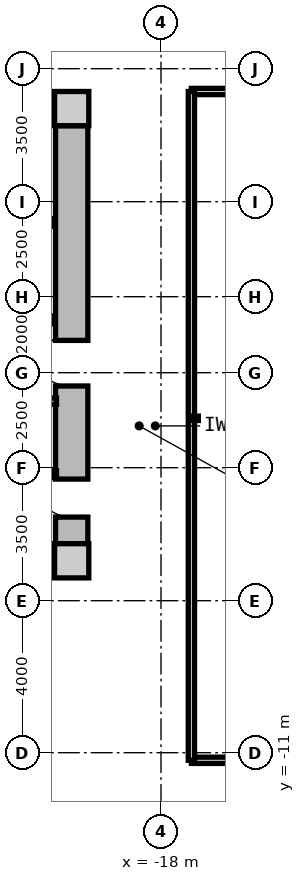
"""IFC4 building model, lengths in metres.
Left out: names, types, materials, properties, quantities, classifications, styles, units other than length and angle.
Written with IfcOpenShell. Run it as: python <this file> out.ifc"""

import sys

from ifc_helpers import new_model, si_unit, direction, frame, frame_2d, origin, origin_2d, place, context, subcontext, project, spatial, rectangle, extrude, source, transform, mapped, element, fill, save


model = new_model("IFC4")
c1 = context("Model", 3, precision=1e-05, world=origin(), true_north=direction((0.0, 1.0)))
c2 = subcontext(c1, "Body", "Model", "MODEL_VIEW")
j1 = project(units=[si_unit("LENGTHUNIT", "METRE"), si_unit("PLANEANGLEUNIT", "RADIAN")], contexts=[c1])
p1 = place(None, origin())
s1 = spatial("IfcSite", under=j1, at=p1, CompositionType="ELEMENT")
p2 = place(p1, origin())
s2 = spatial("IfcBuilding", under=s1, at=p2, CompositionType="ELEMENT")
p3 = place(p2, frame((0.0, 0.0, 16.8)))
s3 = spatial("IfcBuildingStorey", under=s2, at=p3, CompositionType="ELEMENT", Elevation=16.8)
m1 = source(origin(), c2, "Body", "SweptSolid", [
    extrude(rectangle(XDim=0.9, YDim=0.9, at=origin_2d()), origin(), (0.0, 0.0, 1.0), 4.8),
])
for number, where, z_axis, x_axis in (
    (1, (-20.35, -5.95, 0.0), (0.0, 0.0, 1.0), (1.0, 0.0, 0.0)),
    (2, (-20.35, 5.95, 0.0), (0.0, 0.0, 1.0), (1.0, 0.0, 0.0)),
):
    element("IfcColumn", number, at=place(p3, frame(where, z_axis=z_axis, x_axis=x_axis)), inside=s3, PredefinedType="COLUMN", context=c2, shape_type="MappedRepresentation", body=[
        mapped(m1, transform((0.0, 0.0, 0.0), x_axis=(1.0, 0.0, 0.0), y_axis=(0.0, 1.0, 0.0), z_axis=(0.0, 0.0, 1.0), scale=1.0)),
    ])
m2 = source(origin(), c2, "Body", "SweptSolid", [
    extrude(rectangle(XDim=14.4, YDim=0.85, at=frame_2d((7.2, 0.0))), origin(), (0.0, 0.0, 1.0), 4.38),
])
for number, where, z_axis, x_axis in (
    (3, (-35.2, 5.95, 0.0), (0.0, 0.0, 1.0), (1.0, 0.0, 0.0)),
    (4, (-20.8, -5.95, 0.0), (0.0, 0.0, 1.0), (-1.0, 0.0, 0.0)),
):
    element("IfcWall", number, at=place(p3, frame(where, z_axis=z_axis, x_axis=x_axis)), inside=s3, PredefinedType="SHEAR", context=c2, shape_type="MappedRepresentation", body=[
        mapped(m2, transform((0.0, 0.0, 0.0), x_axis=(1.0, 0.0, 0.0), y_axis=(0.0, 1.0, 0.0), z_axis=(0.0, 0.0, 1.0), scale=1.0)),
    ])
m3 = source(origin(), c2, "Body", "SweptSolid", [
    extrude(rectangle(XDim=11.0, YDim=0.85, at=frame_2d((5.5, 0.0))), origin(), (0.0, 0.0, 1.0), 4.38),
])
p4 = place(p3, frame((-20.35, 5.5, 0.0), z_axis=(0.0, 0.0, 1.0), x_axis=(0.0, -1.0, 0.0)))
e5 = element("IfcWall", 5, at=p4, inside=s3, PredefinedType="SHEAR", context=c2, shape_type="MappedRepresentation", body=[
    mapped(m3, transform((0.0, 0.0, 0.0), x_axis=(1.0, 0.0, 0.0), y_axis=(0.0, 1.0, 0.0), z_axis=(0.0, 0.0, 1.0), scale=1.0)),
])
p5 = place(p4, frame((5.65, 0.0, 0.0)))
e6 = element("IfcOpeningElement", 6, at=p5, cuts=e5, PredefinedType="OPENING", context=c2, shape_type="SweptSolid", body=[
    extrude(rectangle(XDim=1.2, YDim=2.15, at=frame_2d((0.6, 1.075))), frame((0.0, 0.435, 0.0), z_axis=(0.0, -1.0, 0.0), x_axis=(1.0, 0.0, 0.0)), (0.0, 0.0, 1.0), 0.87),
])
p6 = place(p4, frame((9.3, 0.0, 0.0)))
e7 = element("IfcOpeningElement", 7, at=p6, cuts=e5, PredefinedType="OPENING", context=c2, shape_type="SweptSolid", body=[
    extrude(rectangle(XDim=1.0, YDim=2.1, at=frame_2d((0.5, 1.05))), frame((0.0, 0.435, 0.0), z_axis=(0.0, -1.0, 0.0), x_axis=(1.0, 0.0, 0.0)), (0.0, 0.0, 1.0), 0.87),
])
m4 = source(origin(), c2, "Body", "SweptSolid", [
    extrude(rectangle(XDim=3.2, YDim=0.2, at=frame_2d((1.6, 0.0))), origin(), (0.0, 0.0, 1.0), 4.365),
])
p7 = place(p3, frame((-24.0, 2.95, 0.0), z_axis=(0.0, 0.0, 1.0), x_axis=(1.0, 0.0, 0.0)))
e8 = element("IfcWall", 8, at=p7, inside=s3, PredefinedType="PARTITIONING", context=c2, shape_type="MappedRepresentation", body=[
    mapped(m4, transform((0.0, 0.0, 0.0), x_axis=(1.0, 0.0, 0.0), y_axis=(0.0, 1.0, 0.0), z_axis=(0.0, 0.0, 1.0), scale=1.0)),
])
m5 = source(origin(), c2, "Body", "SweptSolid", [
    extrude(rectangle(XDim=6.66, YDim=0.21, at=frame_2d((3.33, 0.0))), origin(), (0.0, 0.0, 1.0), 4.365),
])
p8 = place(p3, frame((-27.46, 0.39, 0.0), z_axis=(0.0, 0.0, 1.0), x_axis=(1.0, 0.0, 0.0)))
e9 = element("IfcWall", 9, at=p8, inside=s3, PredefinedType="PARTITIONING", context=c2, shape_type="MappedRepresentation", body=[
    mapped(m5, transform((0.0, 0.0, 0.0), x_axis=(1.0, 0.0, 0.0), y_axis=(0.0, 1.0, 0.0), z_axis=(0.0, 0.0, 1.0), scale=1.0)),
])
p9 = place(p8, frame((1.0, 0.0, 0.0)))
e10 = element("IfcOpeningElement", 10, at=p9, cuts=e9, PredefinedType="OPENING", context=c2, shape_type="SweptSolid", body=[
    extrude(rectangle(XDim=1.2, YDim=2.15, at=frame_2d((0.6, 1.075))), frame((0.0, 0.115, 0.0), z_axis=(0.0, -1.0, 0.0), x_axis=(1.0, 0.0, 0.0)), (0.0, 0.0, 1.0), 0.23),
])
m6 = source(origin(), c2, "Body", "SweptSolid", [
    extrude(rectangle(XDim=2.7, YDim=0.165, at=frame_2d((1.35, 0.0))), origin(), (0.0, 0.0, 1.0), 4.365),
])
p10 = place(p3, frame((-23.45, -1.75, 0.0), z_axis=(0.0, 0.0, 1.0), x_axis=(1.0, 0.0, 0.0)))
e11 = element("IfcWall", 11, at=p10, inside=s3, PredefinedType="PARTITIONING", context=c2, shape_type="MappedRepresentation", body=[
    mapped(m6, transform((0.0, 0.0, 0.0), x_axis=(1.0, 0.0, 0.0), y_axis=(0.0, 1.0, 0.0), z_axis=(0.0, 0.0, 1.0), scale=1.0)),
])
p11 = place(p10, frame((0.85, 0.0, 0.0)))
e12 = element("IfcOpeningElement", 12, at=p11, cuts=e11, PredefinedType="OPENING", context=c2, shape_type="SweptSolid", body=[
    extrude(rectangle(XDim=0.925, YDim=2.1, at=frame_2d((0.462, 1.05))), frame((0.0, 0.093, 0.0), z_axis=(0.0, -1.0, 0.0), x_axis=(1.0, 0.0, 0.0)), (0.0, 0.0, 1.0), 0.185),
])
m7 = source(origin(), c2, "Body", "SweptSolid", [
    extrude(rectangle(XDim=2.7, YDim=0.14, at=frame_2d((1.35, 0.0))), origin(), (0.0, 0.0, 1.0), 4.365),
])
p12 = place(p3, frame((-23.45, -3.65, 0.0), z_axis=(0.0, 0.0, 1.0), x_axis=(1.0, 0.0, 0.0)))
e13 = element("IfcWall", 13, at=p12, inside=s3, PredefinedType="PARTITIONING", context=c2, shape_type="MappedRepresentation", body=[
    mapped(m7, transform((0.0, 0.0, 0.0), x_axis=(1.0, 0.0, 0.0), y_axis=(0.0, 1.0, 0.0), z_axis=(0.0, 0.0, 1.0), scale=1.0)),
])
m8 = source(origin(), c2, "Body", "SweptSolid", [
    extrude(rectangle(XDim=34.4, YDim=0.165, at=frame_2d((17.2, 0.0))), origin(), (0.0, 0.0, 1.0), 4.365),
])
p13 = place(p3, frame((-17.2, -11.2, 0.0), z_axis=(0.0, 0.0, 1.0), x_axis=(1.0, 0.0, 0.0)))
e14 = element("IfcWall", 14, at=p13, inside=s3, PredefinedType="PARTITIONING", context=c2, shape_type="MappedRepresentation", body=[
    mapped(m8, transform((0.0, 0.0, 0.0), x_axis=(1.0, 0.0, 0.0), y_axis=(0.0, 1.0, 0.0), z_axis=(0.0, 0.0, 1.0), scale=1.0)),
])
p14 = place(p13, frame((2.2, 0.0, 0.0)))
e15 = element("IfcOpeningElement", 15, at=p14, cuts=e14, PredefinedType="OPENING", context=c2, shape_type="SweptSolid", body=[
    extrude(rectangle(XDim=1.05, YDim=2.15, at=frame_2d((0.525, 1.075))), frame((0.0, 0.093, 0.0), z_axis=(0.0, -1.0, 0.0), x_axis=(1.0, 0.0, 0.0)), (0.0, 0.0, 1.0), 0.185),
])
p15 = place(p13, frame((7.55, 0.0, 0.0)))
e16 = element("IfcOpeningElement", 16, at=p15, cuts=e14, PredefinedType="OPENING", context=c2, shape_type="SweptSolid", body=[
    extrude(rectangle(XDim=1.05, YDim=2.15, at=frame_2d((0.525, 1.075))), frame((0.0, 0.093, 0.0), z_axis=(0.0, -1.0, 0.0), x_axis=(1.0, 0.0, 0.0)), (0.0, 0.0, 1.0), 0.185),
])
p16 = place(p13, frame((13.45, 0.0, 0.0)))
e17 = element("IfcOpeningElement", 17, at=p16, cuts=e14, PredefinedType="OPENING", context=c2, shape_type="SweptSolid", body=[
    extrude(rectangle(XDim=1.05, YDim=2.15, at=frame_2d((0.525, 1.075))), frame((0.0, 0.093, 0.0), z_axis=(0.0, -1.0, 0.0), x_axis=(1.0, 0.0, 0.0)), (0.0, 0.0, 1.0), 0.185),
])
p17 = place(p13, frame((19.95, 0.0, 0.0)))
e18 = element("IfcOpeningElement", 18, at=p17, cuts=e14, PredefinedType="OPENING", context=c2, shape_type="SweptSolid", body=[
    extrude(rectangle(XDim=1.05, YDim=2.15, at=frame_2d((0.525, 1.075))), frame((0.0, 0.093, 0.0), z_axis=(0.0, -1.0, 0.0), x_axis=(1.0, 0.0, 0.0)), (0.0, 0.0, 1.0), 0.185),
])
p18 = place(p13, frame((25.85, 0.0, 0.0)))
e19 = element("IfcOpeningElement", 19, at=p18, cuts=e14, PredefinedType="OPENING", context=c2, shape_type="SweptSolid", body=[
    extrude(rectangle(XDim=1.05, YDim=2.15, at=frame_2d((0.525, 1.075))), frame((0.0, 0.093, 0.0), z_axis=(0.0, -1.0, 0.0), x_axis=(1.0, 0.0, 0.0)), (0.0, 0.0, 1.0), 0.185),
])
p19 = place(p13, frame((31.2, 0.0, 0.0)))
e20 = element("IfcOpeningElement", 20, at=p19, cuts=e14, PredefinedType="OPENING", context=c2, shape_type="SweptSolid", body=[
    extrude(rectangle(XDim=1.05, YDim=2.15, at=frame_2d((0.525, 1.075))), frame((0.0, 0.093, 0.0), z_axis=(0.0, -1.0, 0.0), x_axis=(1.0, 0.0, 0.0)), (0.0, 0.0, 1.0), 0.185),
])
m9 = source(origin(), c2, "Body", "SweptSolid", [
    extrude(rectangle(XDim=34.4, YDim=0.165, at=frame_2d((17.2, 0.0))), origin(), (0.0, 0.0, 1.0), 2.765),
])
p20 = place(p3, frame((-17.2, 6.4, 0.0), z_axis=(0.0, 0.0, 1.0), x_axis=(1.0, 0.0, 0.0)))
e21 = element("IfcWall", 21, at=p20, inside=s3, PredefinedType="PARTITIONING", context=c2, shape_type="MappedRepresentation", body=[
    mapped(m9, transform((0.0, 0.0, 0.0), x_axis=(1.0, 0.0, 0.0), y_axis=(0.0, 1.0, 0.0), z_axis=(0.0, 0.0, 1.0), scale=1.0)),
])
p21 = place(p20, frame((2.2, 0.0, 0.0)))
e22 = element("IfcOpeningElement", 22, at=p21, cuts=e21, PredefinedType="OPENING", context=c2, shape_type="SweptSolid", body=[
    extrude(rectangle(XDim=1.05, YDim=2.15, at=frame_2d((0.525, 1.075))), frame((0.0, 0.093, 0.0), z_axis=(0.0, -1.0, 0.0), x_axis=(1.0, 0.0, 0.0)), (0.0, 0.0, 1.0), 0.185),
])
p22 = place(p20, frame((7.55, 0.0, 0.0)))
e23 = element("IfcOpeningElement", 23, at=p22, cuts=e21, PredefinedType="OPENING", context=c2, shape_type="SweptSolid", body=[
    extrude(rectangle(XDim=1.05, YDim=2.15, at=frame_2d((0.525, 1.075))), frame((0.0, 0.093, 0.0), z_axis=(0.0, -1.0, 0.0), x_axis=(1.0, 0.0, 0.0)), (0.0, 0.0, 1.0), 0.185),
])
p23 = place(p20, frame((13.45, 0.0, 0.0)))
e24 = element("IfcOpeningElement", 24, at=p23, cuts=e21, PredefinedType="OPENING", context=c2, shape_type="SweptSolid", body=[
    extrude(rectangle(XDim=0.92, YDim=2.1, at=frame_2d((0.46, 1.05))), frame((0.0, 0.093, 0.0), z_axis=(0.0, -1.0, 0.0), x_axis=(1.0, 0.0, 0.0)), (0.0, 0.0, 1.0), 0.185),
])
p24 = place(p20, frame((19.95, 0.0, 0.0)))
e25 = element("IfcOpeningElement", 25, at=p24, cuts=e21, PredefinedType="OPENING", context=c2, shape_type="SweptSolid", body=[
    extrude(rectangle(XDim=1.05, YDim=2.15, at=frame_2d((0.525, 1.075))), frame((0.0, 0.093, 0.0), z_axis=(0.0, -1.0, 0.0), x_axis=(1.0, 0.0, 0.0)), (0.0, 0.0, 1.0), 0.185),
])
p25 = place(p20, frame((25.85, 0.0, 0.0)))
e26 = element("IfcOpeningElement", 26, at=p25, cuts=e21, PredefinedType="OPENING", context=c2, shape_type="SweptSolid", body=[
    extrude(rectangle(XDim=1.05, YDim=2.15, at=frame_2d((0.525, 1.075))), frame((0.0, 0.093, 0.0), z_axis=(0.0, -1.0, 0.0), x_axis=(1.0, 0.0, 0.0)), (0.0, 0.0, 1.0), 0.185),
])
p26 = place(p20, frame((31.2, 0.0, 0.0)))
e27 = element("IfcOpeningElement", 27, at=p26, cuts=e21, PredefinedType="OPENING", context=c2, shape_type="SweptSolid", body=[
    extrude(rectangle(XDim=0.92, YDim=2.1, at=frame_2d((0.46, 1.05))), frame((0.0, 0.093, 0.0), z_axis=(0.0, -1.0, 0.0), x_axis=(1.0, 0.0, 0.0)), (0.0, 0.0, 1.0), 0.185),
])
m10 = source(origin(), c2, "Body", "SweptSolid", [
    extrude(rectangle(XDim=17.6, YDim=0.165, at=frame_2d((8.8, 0.0))), origin(), (0.0, 0.0, 1.0), 4.365),
])
p27 = place(p3, frame((-17.2, -11.2, 0.0), z_axis=(0.0, 0.0, 1.0), x_axis=(0.0, 1.0, 0.0)))
e28 = element("IfcWall", 28, at=p27, inside=s3, PredefinedType="PARTITIONING", context=c2, shape_type="MappedRepresentation", body=[
    mapped(m10, transform((0.0, 0.0, 0.0), x_axis=(1.0, 0.0, 0.0), y_axis=(0.0, 1.0, 0.0), z_axis=(0.0, 0.0, 1.0), scale=1.0)),
])
m11 = source(origin(), c2, "Body", "SweptSolid", [
    extrude(rectangle(XDim=34.4, YDim=0.115, at=frame_2d((17.2, 0.0))), origin(), (0.0, 0.0, 1.0), 2.765),
])
p28 = place(p3, frame((-17.2, -2.2, 0.0), z_axis=(0.0, 0.0, 1.0), x_axis=(1.0, 0.0, 0.0)))
e29 = element("IfcWall", 29, at=p28, inside=s3, PredefinedType="PARTITIONING", context=c2, shape_type="MappedRepresentation", body=[
    mapped(m11, transform((0.0, 0.0, 0.0), x_axis=(1.0, 0.0, 0.0), y_axis=(0.0, 1.0, 0.0), z_axis=(0.0, 0.0, 1.0), scale=1.0)),
])
m12 = source(origin(), c2, "Body", "SweptSolid", [
    extrude(rectangle(XDim=1.2, YDim=2.15, at=frame_2d((0.6, 1.075))), frame((0.0, 0.025, 0.0), z_axis=(0.0, -1.0, 0.0), x_axis=(1.0, 0.0, 0.0)), (0.0, 0.0, 1.0), 0.05),
])
p29 = place(p5, frame((1.2, 0.0, 0.0), z_axis=(0.0, 0.0, 1.0), x_axis=(-1.0, 0.0, 0.0)))
e30 = element("IfcDoor", 30, at=p29, inside=s3, OperationType="SINGLE_SWING_RIGHT", PredefinedType="DOOR", context=c2, shape_type="MappedRepresentation", body=[
    mapped(m12, transform((0.0, 0.0, 0.0), x_axis=(1.0, 0.0, 0.0), y_axis=(0.0, 1.0, 0.0), z_axis=(0.0, 0.0, 1.0), scale=1.0)),
])
fill(e6, e30)
m13 = source(origin(), c2, "Body", "SweptSolid", [
    extrude(rectangle(XDim=1.0, YDim=2.1, at=frame_2d((0.5, 1.05))), frame((0.0, 0.025, 0.0), z_axis=(0.0, -1.0, 0.0), x_axis=(1.0, 0.0, 0.0)), (0.0, 0.0, 1.0), 0.05),
])
p30 = place(p6, frame((1.0, 0.0, 0.0), z_axis=(0.0, 0.0, 1.0), x_axis=(-1.0, 0.0, 0.0)))
e31 = element("IfcDoor", 31, at=p30, inside=s3, OperationType="SINGLE_SWING_RIGHT", PredefinedType="DOOR", context=c2, shape_type="MappedRepresentation", body=[
    mapped(m13, transform((0.0, 0.0, 0.0), x_axis=(1.0, 0.0, 0.0), y_axis=(0.0, 1.0, 0.0), z_axis=(0.0, 0.0, 1.0), scale=1.0)),
])
fill(e7, e31)
save(model, sys.argv[1])
